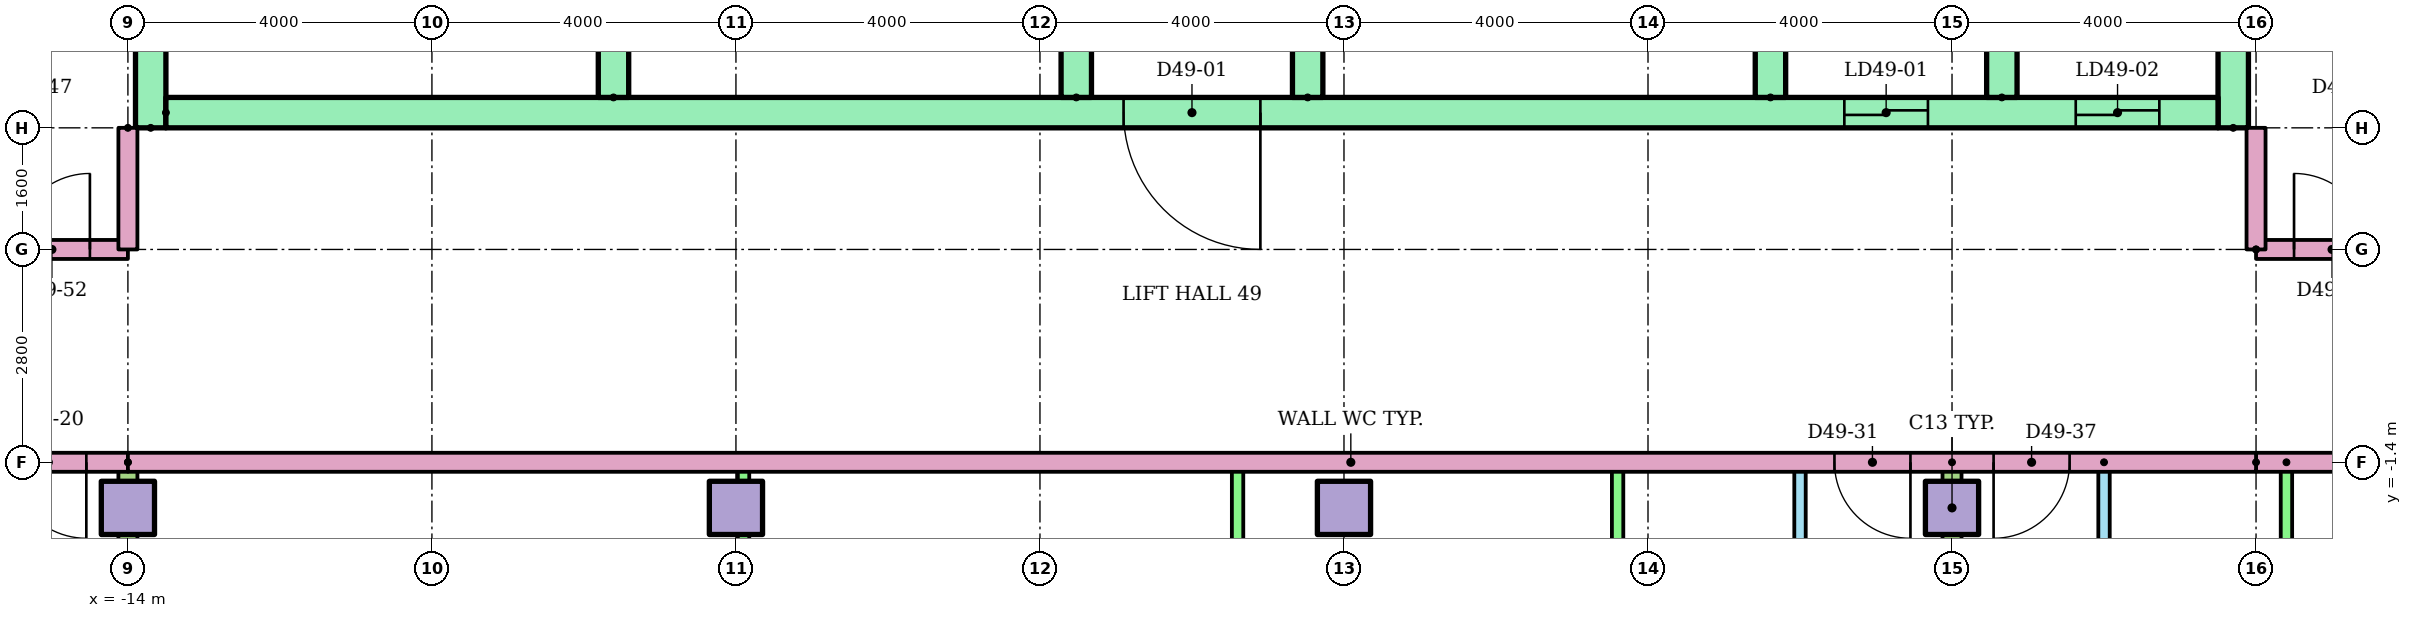
"""IFC4 building model, lengths in metres.
Left out: names, types, materials, properties, quantities, classifications, styles, units other than length and angle.
Written with IfcOpenShell. Run it as: python <this file> out.ifc"""

import sys

from ifc_helpers import new_model, si_unit, direction, frame, frame_2d, origin, origin_2d, place, context, subcontext, project, spatial, rectangle, extrude, element, fill, save


model = new_model("IFC4")
c1 = context("Model", 3, precision=1e-05, world=origin(), true_north=direction((0.0, 1.0)))
c2 = subcontext(c1, "Body", "Model", "MODEL_VIEW")
j1 = project(units=[si_unit("LENGTHUNIT", "METRE"), si_unit("PLANEANGLEUNIT", "RADIAN")], contexts=[c1])
p1 = place(None, origin())
s1 = spatial("IfcSite", under=j1, at=p1, CompositionType="ELEMENT")
p2 = place(p1, origin())
s2 = spatial("IfcBuilding", under=s1, at=p2, CompositionType="ELEMENT")
p3 = place(p2, frame((0.0, 0.0, 187.7)))
s3 = spatial("IfcBuildingStorey", under=s2, at=p3, CompositionType="ELEMENT", Elevation=187.7)
for number, where in (
    (1, (-14.0, -2.0, 0.0)),
    (2, (-6.0, -2.0, 0.0)),
    (3, (2.0, -2.0, 0.0)),
    (4, (10.0, -2.0, 0.0)),
):
    element("IfcColumn", number, at=place(p3, frame(where)), inside=s3, PredefinedType="COLUMN", context=c2, shape_type="SweptSolid", body=[
        extrude(rectangle(XDim=0.7, YDim=0.7, at=origin_2d()), origin(), (0.0, 0.0, 1.0), 3.2),
    ])
for number, where, z_axis, x_axis in (
    (5, (-13.7, 3.0, 0.0), (0.0, 0.0, 1.0), (0.0, 1.0, 0.0)),
    (6, (13.7, 3.0, 0.0), (0.0, 0.0, 1.0), (0.0, 1.0, 0.0)),
):
    element("IfcWall", number, at=place(p3, frame(where, z_axis=z_axis, x_axis=x_axis)), inside=s3, PredefinedType="SHEAR", context=c2, shape_type="SweptSolid", body=[
        extrude(rectangle(XDim=17.0, YDim=0.4, at=frame_2d((8.5, 0.0))), origin(), (0.0, 0.0, 1.0), 2.92),
    ])
p4 = place(p3, frame((-13.5, 3.2, 0.0)))
e7 = element("IfcWall", 7, at=p4, inside=s3, PredefinedType="SHEAR", context=c2, shape_type="SweptSolid", body=[
    extrude(rectangle(XDim=27.0, YDim=0.4, at=frame_2d((13.5, 0.0))), origin(), (0.0, 0.0, 1.0), 2.92),
])
p5 = place(p4, frame((22.083, 0.0, 0.0)))
e8 = element("IfcOpeningElement", 8, at=p5, cuts=e7, PredefinedType="OPENING", context=c2, shape_type="SweptSolid", body=[
    extrude(rectangle(XDim=1.1, YDim=2.1, at=frame_2d((0.55, 1.05))), frame((0.0, 0.21, 0.0), z_axis=(0.0, -1.0, 0.0), x_axis=(1.0, 0.0, 0.0)), (0.0, 0.0, 1.0), 0.42),
])
p6 = place(p4, frame((25.128, 0.0, 0.0)))
e9 = element("IfcOpeningElement", 9, at=p6, cuts=e7, PredefinedType="OPENING", context=c2, shape_type="SweptSolid", body=[
    extrude(rectangle(XDim=1.1, YDim=2.1, at=frame_2d((0.55, 1.05))), frame((0.0, 0.21, 0.0), z_axis=(0.0, -1.0, 0.0), x_axis=(1.0, 0.0, 0.0)), (0.0, 0.0, 1.0), 0.42),
])
p7 = place(p4, frame((12.6, 0.0, 0.0)))
e10 = element("IfcOpeningElement", 10, at=p7, cuts=e7, PredefinedType="OPENING", context=c2, shape_type="SweptSolid", body=[
    extrude(rectangle(XDim=1.8, YDim=2.1, at=frame_2d((0.9, 1.05))), frame((0.0, 0.21, 0.0), z_axis=(0.0, -1.0, 0.0), x_axis=(1.0, 0.0, 0.0)), (0.0, 0.0, 1.0), 0.42),
])
for number, where, z_axis, x_axis in (
    (11, (-7.611, 3.4, 0.0), (0.0, 0.0, 1.0), (0.0, 1.0, 0.0)),
    (12, (-1.522, 3.4, 0.0), (0.0, 0.0, 1.0), (0.0, 1.0, 0.0)),
    (13, (1.522, 3.4, 0.0), (0.0, 0.0, 1.0), (0.0, 1.0, 0.0)),
    (14, (7.611, 3.4, 0.0), (0.0, 0.0, 1.0), (0.0, 1.0, 0.0)),
    (15, (10.656, 3.4, 0.0), (0.0, 0.0, 1.0), (0.0, 1.0, 0.0)),
):
    element("IfcWall", number, at=place(p3, frame(where, z_axis=z_axis, x_axis=x_axis)), inside=s3, PredefinedType="SHEAR", context=c2, shape_type="SweptSolid", body=[
        extrude(rectangle(XDim=3.0, YDim=0.4, at=frame_2d((1.5, 0.0))), origin(), (0.0, 0.0, 1.0), 2.92),
    ])
p8 = place(p3, frame((8.0, -6.9, 0.0), z_axis=(0.0, 0.0, 1.0), x_axis=(0.0, 1.0, 0.0)))
e16 = element("IfcWall", 16, at=p8, inside=s3, PredefinedType="PARTITIONING", context=c2, shape_type="SweptSolid", body=[
    extrude(rectangle(XDim=5.5, YDim=0.15, at=frame_2d((2.75, 0.0))), origin(), (0.0, 0.0, 1.0), 2.4),
])
p9 = place(p8, frame((3.55, 0.0, 0.0)))
e17 = element("IfcOpeningElement", 17, at=p9, cuts=e16, PredefinedType="OPENING", context=c2, shape_type="SweptSolid", body=[
    extrude(rectangle(XDim=0.9, YDim=2.1, at=frame_2d((0.45, 1.05))), frame((0.0, 0.085, 0.0), z_axis=(0.0, -1.0, 0.0), x_axis=(1.0, 0.0, 0.0)), (0.0, 0.0, 1.0), 0.17),
])
p10 = place(p8, frame((0.85, 0.0, 0.0)))
e18 = element("IfcOpeningElement", 18, at=p10, cuts=e16, PredefinedType="OPENING", context=c2, shape_type="SweptSolid", body=[
    extrude(rectangle(XDim=0.8, YDim=2.1, at=frame_2d((0.4, 1.05))), frame((0.0, 0.085, 0.0), z_axis=(0.0, -1.0, 0.0), x_axis=(1.0, 0.0, 0.0)), (0.0, 0.0, 1.0), 0.17),
])
for number, where, z_axis, x_axis in (
    (19, (5.6, -6.9, 0.0), (0.0, 0.0, 1.0), (0.0, 1.0, 0.0)),
    (20, (0.6, -6.9, 0.0), (0.0, 0.0, 1.0), (0.0, 1.0, 0.0)),
    (21, (-5.9, -6.9, 0.0), (0.0, 0.0, 1.0), (0.0, 1.0, 0.0)),
):
    element("IfcWall", number, at=place(p3, frame(where, z_axis=z_axis, x_axis=x_axis)), inside=s3, PredefinedType="PARTITIONING", context=c2, shape_type="SweptSolid", body=[
        extrude(rectangle(XDim=5.5, YDim=0.15, at=frame_2d((2.75, 0.0))), origin(), (0.0, 0.0, 1.0), 2.4),
    ])
p11 = place(p3, frame((-14.0, -1.4, 0.0), z_axis=(0.0, 0.0, 1.0), x_axis=(0.0, -1.0, 0.0)))
e22 = element("IfcWall", 22, at=p11, inside=s3, PredefinedType="PARTITIONING", context=c2, shape_type="SweptSolid", body=[
    extrude(rectangle(XDim=15.01, YDim=0.25, at=frame_2d((7.505, 0.0))), origin(), (0.0, 0.0, 1.0), 2.4),
])
p12 = place(p3, frame((12.0, -1.4, 0.0), z_axis=(0.0, 0.0, 1.0), x_axis=(0.0, -1.0, 0.0)))
e23 = element("IfcWall", 23, at=p12, inside=s3, PredefinedType="PARTITIONING", context=c2, shape_type="SweptSolid", body=[
    extrude(rectangle(XDim=5.5, YDim=0.15, at=frame_2d((2.75, 0.0))), origin(), (0.0, 0.0, 1.0), 2.4),
])
p13 = place(p12, frame((1.05, 0.0, 0.0)))
e24 = element("IfcOpeningElement", 24, at=p13, cuts=e23, PredefinedType="OPENING", context=c2, shape_type="SweptSolid", body=[
    extrude(rectangle(XDim=0.9, YDim=2.1, at=frame_2d((0.45, 1.05))), frame((0.0, 0.085, 0.0), z_axis=(0.0, -1.0, 0.0), x_axis=(1.0, 0.0, 0.0)), (0.0, 0.0, 1.0), 0.17),
])
p14 = place(p12, frame((3.85, 0.0, 0.0)))
e25 = element("IfcOpeningElement", 25, at=p14, cuts=e23, PredefinedType="OPENING", context=c2, shape_type="SweptSolid", body=[
    extrude(rectangle(XDim=0.8, YDim=2.1, at=frame_2d((0.4, 1.05))), frame((0.0, 0.085, 0.0), z_axis=(0.0, -1.0, 0.0), x_axis=(1.0, 0.0, 0.0)), (0.0, 0.0, 1.0), 0.17),
])
p15 = place(p3, frame((14.4, -1.4, 0.0), z_axis=(0.0, 0.0, 1.0), x_axis=(0.0, -1.0, 0.0)))
e26 = element("IfcWall", 26, at=p15, inside=s3, PredefinedType="PARTITIONING", context=c2, shape_type="SweptSolid", body=[
    extrude(rectangle(XDim=5.5, YDim=0.15, at=frame_2d((2.75, 0.0))), origin(), (0.0, 0.0, 1.0), 2.4),
])
p16 = place(p3, frame((10.0, -1.4, 0.0), z_axis=(0.0, 0.0, 1.0), x_axis=(0.0, -1.0, 0.0)))
e27 = element("IfcWall", 27, at=p16, inside=s3, PredefinedType="PARTITIONING", context=c2, shape_type="SweptSolid", body=[
    extrude(rectangle(XDim=15.01, YDim=0.25, at=frame_2d((7.505, 0.0))), origin(), (0.0, 0.0, 1.0), 2.4),
])
p17 = place(p3, frame((-14.0, -1.4, 0.0), z_axis=(0.0, 0.0, 1.0), x_axis=(-1.0, 0.0, 0.0)))
e28 = element("IfcWall", 28, at=p17, inside=s3, PredefinedType="PARTITIONING", context=c2, shape_type="SweptSolid", body=[
    extrude(rectangle(XDim=10.82, YDim=0.25, at=frame_2d((5.41, 0.0))), origin(), (0.0, 0.0, 1.0), 2.4),
])
p18 = place(p17, frame((0.547, 0.0, 0.0)))
e29 = element("IfcOpeningElement", 29, at=p18, cuts=e28, PredefinedType="OPENING", context=c2, shape_type="SweptSolid", body=[
    extrude(rectangle(XDim=1.0, YDim=2.1, at=frame_2d((0.5, 1.05))), frame((0.0, 0.135, 0.0), z_axis=(0.0, -1.0, 0.0), x_axis=(1.0, 0.0, 0.0)), (0.0, 0.0, 1.0), 0.27),
])
p19 = place(p3, frame((29.0, -1.4, 0.0), z_axis=(0.0, 0.0, 1.0), x_axis=(-1.0, 0.0, 0.0)))
e30 = element("IfcWall", 30, at=p19, inside=s3, PredefinedType="PARTITIONING", context=c2, shape_type="SweptSolid", body=[
    extrude(rectangle(XDim=15.0, YDim=0.25, at=frame_2d((7.5, 0.0))), origin(), (0.0, 0.0, 1.0), 2.4),
])
p20 = place(p19, frame((9.453, 0.0, 0.0)))
e31 = element("IfcOpeningElement", 31, at=p20, cuts=e30, PredefinedType="OPENING", context=c2, shape_type="SweptSolid", body=[
    extrude(rectangle(XDim=1.0, YDim=2.1, at=frame_2d((0.5, 1.05))), frame((0.0, 0.135, 0.0), z_axis=(0.0, -1.0, 0.0), x_axis=(1.0, 0.0, 0.0)), (0.0, 0.0, 1.0), 0.27),
])
p21 = place(p3, frame((-24.82, 1.4, 0.0)))
e32 = element("IfcWall", 32, at=p21, inside=s3, PredefinedType="PARTITIONING", context=c2, shape_type="SweptSolid", body=[
    extrude(rectangle(XDim=10.82, YDim=0.25, at=frame_2d((5.41, 0.0))), origin(), (0.0, 0.0, 1.0), 2.4),
])
p22 = place(p21, frame((9.32, 0.0, 0.0)))
e33 = element("IfcOpeningElement", 33, at=p22, cuts=e32, PredefinedType="OPENING", context=c2, shape_type="SweptSolid", body=[
    extrude(rectangle(XDim=1.0, YDim=2.1, at=frame_2d((0.5, 1.05))), frame((0.0, 0.135, 0.0), z_axis=(0.0, -1.0, 0.0), x_axis=(1.0, 0.0, 0.0)), (0.0, 0.0, 1.0), 0.27),
])
p23 = place(p3, frame((14.0, 1.4, 0.0)))
e34 = element("IfcWall", 34, at=p23, inside=s3, PredefinedType="PARTITIONING", context=c2, shape_type="SweptSolid", body=[
    extrude(rectangle(XDim=15.0, YDim=0.25, at=frame_2d((7.5, 0.0))), origin(), (0.0, 0.0, 1.0), 2.4),
])
p24 = place(p23, frame((0.5, 0.0, 0.0)))
e35 = element("IfcOpeningElement", 35, at=p24, cuts=e34, PredefinedType="OPENING", context=c2, shape_type="SweptSolid", body=[
    extrude(rectangle(XDim=1.0, YDim=2.1, at=frame_2d((0.5, 1.05))), frame((0.0, 0.135, 0.0), z_axis=(0.0, -1.0, 0.0), x_axis=(1.0, 0.0, 0.0)), (0.0, 0.0, 1.0), 0.27),
])
p25 = place(p23, frame((12.547, 0.0, 0.0)))
e36 = element("IfcOpeningElement", 36, at=p25, cuts=e34, PredefinedType="OPENING", context=c2, shape_type="SweptSolid", body=[
    extrude(rectangle(XDim=1.0, YDim=2.1, at=frame_2d((0.5, 1.05))), frame((0.0, 0.135, 0.0), z_axis=(0.0, -1.0, 0.0), x_axis=(1.0, 0.0, 0.0)), (0.0, 0.0, 1.0), 0.27),
])
p26 = place(p3, frame((14.0, -1.4, 0.0), z_axis=(0.0, 0.0, 1.0), x_axis=(-1.0, 0.0, 0.0)))
e37 = element("IfcWall", 37, at=p26, inside=s3, PredefinedType="PARTITIONING", context=c2, shape_type="SweptSolid", body=[
    extrude(rectangle(XDim=28.0, YDim=0.25, at=frame_2d((14.0, 0.0))), origin(), (0.0, 0.0, 1.0), 2.4),
])
p27 = place(p26, frame((4.547, 0.0, 0.0)))
e38 = element("IfcOpeningElement", 38, at=p27, cuts=e37, PredefinedType="OPENING", context=c2, shape_type="SweptSolid", body=[
    extrude(rectangle(XDim=1.0, YDim=2.1, at=frame_2d((0.5, 1.05))), frame((0.0, 0.135, 0.0), z_axis=(0.0, -1.0, 0.0), x_axis=(1.0, 0.0, 0.0)), (0.0, 0.0, 1.0), 0.27),
])
p28 = place(p26, frame((2.453, 0.0, 0.0)))
e39 = element("IfcOpeningElement", 39, at=p28, cuts=e37, PredefinedType="OPENING", context=c2, shape_type="SweptSolid", body=[
    extrude(rectangle(XDim=1.0, YDim=2.1, at=frame_2d((0.5, 1.05))), frame((0.0, 0.135, 0.0), z_axis=(0.0, -1.0, 0.0), x_axis=(1.0, 0.0, 0.0)), (0.0, 0.0, 1.0), 0.27),
])
for number, where, z_axis, x_axis in (
    (40, (-14.0, 3.0, 0.0), (0.0, 0.0, 1.0), (0.0, -1.0, 0.0)),
    (41, (14.0, 1.4, 0.0), (0.0, 0.0, 1.0), (0.0, 1.0, 0.0)),
):
    element("IfcWall", number, at=place(p3, frame(where, z_axis=z_axis, x_axis=x_axis)), inside=s3, PredefinedType="PARTITIONING", context=c2, shape_type="SweptSolid", body=[
        extrude(rectangle(XDim=1.6, YDim=0.25, at=frame_2d((0.8, 0.0))), origin(), (0.0, 0.0, 1.0), 2.4),
    ])
p29 = place(p5, origin())
e42 = element("IfcDoor", 42, at=p29, inside=s3, OperationType="SLIDING_TO_LEFT", PredefinedType="DOOR", context=c2, shape_type="SweptSolid", body=[
    extrude(rectangle(XDim=1.1, YDim=2.1, at=frame_2d((0.55, 1.05))), frame((0.0, 0.025, 0.0), z_axis=(0.0, -1.0, 0.0), x_axis=(1.0, 0.0, 0.0)), (0.0, 0.0, 1.0), 0.05),
])
fill(e8, e42)
p30 = place(p6, origin())
e43 = element("IfcDoor", 43, at=p30, inside=s3, OperationType="SLIDING_TO_LEFT", PredefinedType="DOOR", context=c2, shape_type="SweptSolid", body=[
    extrude(rectangle(XDim=1.1, YDim=2.1, at=frame_2d((0.55, 1.05))), frame((0.0, 0.025, 0.0), z_axis=(0.0, -1.0, 0.0), x_axis=(1.0, 0.0, 0.0)), (0.0, 0.0, 1.0), 0.05),
])
fill(e9, e43)
p31 = place(p7, frame((1.8, 0.0, 0.0), z_axis=(0.0, 0.0, 1.0), x_axis=(-1.0, 0.0, 0.0)))
e44 = element("IfcDoor", 44, at=p31, inside=s3, OperationType="DOUBLE_DOOR_SINGLE_SWING", PredefinedType="DOOR", context=c2, shape_type="SweptSolid", body=[
    extrude(rectangle(XDim=1.8, YDim=2.1, at=frame_2d((0.9, 1.05))), frame((0.0, 0.025, 0.0), z_axis=(0.0, -1.0, 0.0), x_axis=(1.0, 0.0, 0.0)), (0.0, 0.0, 1.0), 0.05),
])
fill(e10, e44)
p32 = place(p18, origin())
e45 = element("IfcDoor", 45, at=p32, inside=s3, OperationType="SINGLE_SWING_LEFT", PredefinedType="DOOR", context=c2, shape_type="SweptSolid", body=[
    extrude(rectangle(XDim=1.0, YDim=2.1, at=frame_2d((0.5, 1.05))), frame((0.0, 0.025, 0.0), z_axis=(0.0, -1.0, 0.0), x_axis=(1.0, 0.0, 0.0)), (0.0, 0.0, 1.0), 0.05),
])
fill(e29, e45)
p33 = place(p27, origin())
e46 = element("IfcDoor", 46, at=p33, inside=s3, OperationType="SINGLE_SWING_LEFT", PredefinedType="DOOR", context=c2, shape_type="SweptSolid", body=[
    extrude(rectangle(XDim=1.0, YDim=2.1, at=frame_2d((0.5, 1.05))), frame((0.0, 0.025, 0.0), z_axis=(0.0, -1.0, 0.0), x_axis=(1.0, 0.0, 0.0)), (0.0, 0.0, 1.0), 0.05),
])
fill(e38, e46)
p34 = place(p28, origin())
e47 = element("IfcDoor", 47, at=p34, inside=s3, OperationType="SINGLE_SWING_RIGHT", PredefinedType="DOOR", context=c2, shape_type="SweptSolid", body=[
    extrude(rectangle(XDim=1.0, YDim=2.1, at=frame_2d((0.5, 1.05))), frame((0.0, 0.025, 0.0), z_axis=(0.0, -1.0, 0.0), x_axis=(1.0, 0.0, 0.0)), (0.0, 0.0, 1.0), 0.05),
])
fill(e39, e47)
p35 = place(p22, origin())
e48 = element("IfcDoor", 48, at=p35, inside=s3, OperationType="SINGLE_SWING_RIGHT", PredefinedType="DOOR", context=c2, shape_type="SweptSolid", body=[
    extrude(rectangle(XDim=1.0, YDim=2.1, at=frame_2d((0.5, 1.05))), frame((0.0, 0.025, 0.0), z_axis=(0.0, -1.0, 0.0), x_axis=(1.0, 0.0, 0.0)), (0.0, 0.0, 1.0), 0.05),
])
fill(e33, e48)
p36 = place(p24, origin())
e49 = element("IfcDoor", 49, at=p36, inside=s3, OperationType="SINGLE_SWING_LEFT", PredefinedType="DOOR", context=c2, shape_type="SweptSolid", body=[
    extrude(rectangle(XDim=1.0, YDim=2.1, at=frame_2d((0.5, 1.05))), frame((0.0, 0.025, 0.0), z_axis=(0.0, -1.0, 0.0), x_axis=(1.0, 0.0, 0.0)), (0.0, 0.0, 1.0), 0.05),
])
fill(e35, e49)
save(model, sys.argv[1])
